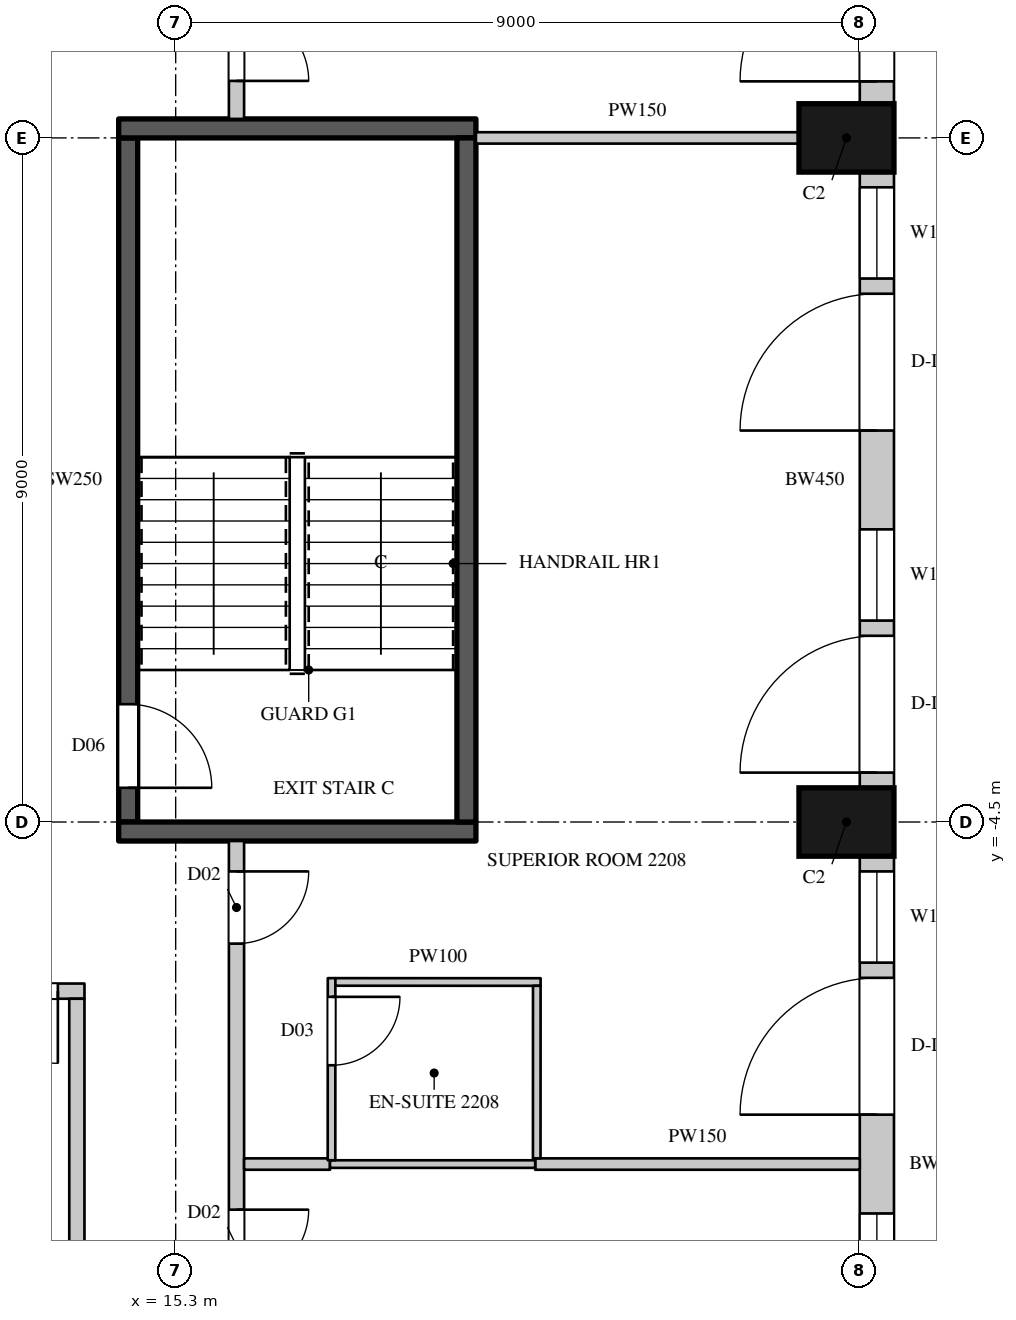
"""IFC4 building model, lengths in metres.
Left out: names, types, materials, properties, quantities, classifications, styles, units other than length and angle.
Written with IfcOpenShell. Run it as: python <this file> out.ifc"""

import sys

from ifc_helpers import new_model, si_unit, direction, frame, frame_2d, origin, origin_2d, place, context, subcontext, project, spatial, rectangle, extrude, element, fill, save


model = new_model("IFC4")
c1 = context("Model", 3, precision=1e-05, world=origin(), true_north=direction((0.0, 1.0)))
c2 = subcontext(c1, "Body", "Model", "MODEL_VIEW")
j1 = project(units=[si_unit("LENGTHUNIT", "METRE"), si_unit("PLANEANGLEUNIT", "RADIAN")], contexts=[c1])
p1 = place(None, origin())
s1 = spatial("IfcSite", under=j1, at=p1, CompositionType="ELEMENT")
p2 = place(p1, origin())
s2 = spatial("IfcBuilding", under=s1, at=p2, CompositionType="ELEMENT")
p3 = place(p2, frame((0.0, 0.0, 109.5)))
s3 = spatial("IfcBuildingStorey", under=s2, at=p3, CompositionType="ELEMENT", Elevation=109.5)
for number, where, z_axis, x_axis in (
    (1, (24.125, -4.5, 0.0), (0.0, 0.0, 1.0), (0.0, 1.0, 0.0)),
    (2, (24.125, 4.5, 0.0), (0.0, 0.0, 1.0), (0.0, 1.0, 0.0)),
):
    element("IfcColumn", number, at=place(p3, frame(where, z_axis=z_axis, x_axis=x_axis)), inside=s3, PredefinedType="COLUMN", context=c2, shape_type="SweptSolid", body=[
        extrude(rectangle(XDim=0.9, YDim=1.25, at=origin_2d()), origin(), (0.0, 0.0, 1.0), 3.6),
    ])
p4 = place(p3, frame((24.525, -13.05, 0.0), z_axis=(0.0, 0.0, 1.0), x_axis=(0.0, 1.0, 0.0)))
e3 = element("IfcWall", 3, at=p4, inside=s3, PredefinedType="SOLIDWALL", context=c2, shape_type="SweptSolid", body=[
    extrude(rectangle(XDim=8.1, YDim=0.45, at=frame_2d((4.05, 0.0))), origin(), (0.0, 0.0, 1.0), 3.3),
])
p5 = place(p4, frame((0.2, 0.0, 0.0)))
e4 = element("IfcOpeningElement", 4, at=p5, cuts=e3, PredefinedType="OPENING", context=c2, shape_type="SweptSolid", body=[
    extrude(rectangle(XDim=1.8, YDim=2.4, at=frame_2d((0.9, 1.2))), frame((0.0, 0.235, 0.0), z_axis=(0.0, -1.0, 0.0), x_axis=(1.0, 0.0, 0.0)), (0.0, 0.0, 1.0), 0.47),
])
p6 = place(p4, frame((2.2, 0.0, 1.05)))
e5 = element("IfcOpeningElement", 5, at=p6, cuts=e3, PredefinedType="OPENING", context=c2, shape_type="SweptSolid", body=[
    extrude(rectangle(XDim=1.2, YDim=2.0, at=frame_2d((0.6, 1.0))), frame((0.0, 0.235, 0.0), z_axis=(0.0, -1.0, 0.0), x_axis=(1.0, 0.0, 0.0)), (0.0, 0.0, 1.0), 0.47),
])
p7 = place(p4, frame((4.7, 0.0, 0.0)))
e6 = element("IfcOpeningElement", 6, at=p7, cuts=e3, PredefinedType="OPENING", context=c2, shape_type="SweptSolid", body=[
    extrude(rectangle(XDim=1.8, YDim=2.4, at=frame_2d((0.9, 1.2))), frame((0.0, 0.235, 0.0), z_axis=(0.0, -1.0, 0.0), x_axis=(1.0, 0.0, 0.0)), (0.0, 0.0, 1.0), 0.47),
])
p8 = place(p4, frame((6.7, 0.0, 1.05)))
e7 = element("IfcOpeningElement", 7, at=p8, cuts=e3, PredefinedType="OPENING", context=c2, shape_type="SweptSolid", body=[
    extrude(rectangle(XDim=1.2, YDim=2.0, at=frame_2d((0.6, 1.0))), frame((0.0, 0.235, 0.0), z_axis=(0.0, -1.0, 0.0), x_axis=(1.0, 0.0, 0.0)), (0.0, 0.0, 1.0), 0.47),
])
p9 = place(p3, frame((24.525, -4.05, 0.0), z_axis=(0.0, 0.0, 1.0), x_axis=(0.0, 1.0, 0.0)))
e8 = element("IfcWall", 8, at=p9, inside=s3, PredefinedType="SOLIDWALL", context=c2, shape_type="SweptSolid", body=[
    extrude(rectangle(XDim=8.1, YDim=0.45, at=frame_2d((4.05, 0.0))), origin(), (0.0, 0.0, 1.0), 3.3),
])
p10 = place(p9, frame((0.2, 0.0, 0.0)))
e9 = element("IfcOpeningElement", 9, at=p10, cuts=e8, PredefinedType="OPENING", context=c2, shape_type="SweptSolid", body=[
    extrude(rectangle(XDim=1.8, YDim=2.4, at=frame_2d((0.9, 1.2))), frame((0.0, 0.235, 0.0), z_axis=(0.0, -1.0, 0.0), x_axis=(1.0, 0.0, 0.0)), (0.0, 0.0, 1.0), 0.47),
])
p11 = place(p9, frame((2.2, 0.0, 1.05)))
e10 = element("IfcOpeningElement", 10, at=p11, cuts=e8, PredefinedType="OPENING", context=c2, shape_type="SweptSolid", body=[
    extrude(rectangle(XDim=1.2, YDim=2.0, at=frame_2d((0.6, 1.0))), frame((0.0, 0.235, 0.0), z_axis=(0.0, -1.0, 0.0), x_axis=(1.0, 0.0, 0.0)), (0.0, 0.0, 1.0), 0.47),
])
p12 = place(p9, frame((4.7, 0.0, 0.0)))
e11 = element("IfcOpeningElement", 11, at=p12, cuts=e8, PredefinedType="OPENING", context=c2, shape_type="SweptSolid", body=[
    extrude(rectangle(XDim=1.8, YDim=2.4, at=frame_2d((0.9, 1.2))), frame((0.0, 0.235, 0.0), z_axis=(0.0, -1.0, 0.0), x_axis=(1.0, 0.0, 0.0)), (0.0, 0.0, 1.0), 0.47),
])
p13 = place(p9, frame((6.7, 0.0, 1.05)))
e12 = element("IfcOpeningElement", 12, at=p13, cuts=e8, PredefinedType="OPENING", context=c2, shape_type="SweptSolid", body=[
    extrude(rectangle(XDim=1.2, YDim=2.0, at=frame_2d((0.6, 1.0))), frame((0.0, 0.235, 0.0), z_axis=(0.0, -1.0, 0.0), x_axis=(1.0, 0.0, 0.0)), (0.0, 0.0, 1.0), 0.47),
])
p14 = place(p3, frame((24.525, 4.95, 0.0), z_axis=(0.0, 0.0, 1.0), x_axis=(0.0, 1.0, 0.0)))
e13 = element("IfcWall", 13, at=p14, inside=s3, PredefinedType="SOLIDWALL", context=c2, shape_type="SweptSolid", body=[
    extrude(rectangle(XDim=8.439, YDim=0.45, at=frame_2d((4.219, 0.0))), origin(), (0.0, 0.0, 1.0), 3.3),
])
p15 = place(p14, frame((0.294, 0.0, 0.0)))
e14 = element("IfcOpeningElement", 14, at=p15, cuts=e13, PredefinedType="OPENING", context=c2, shape_type="SweptSolid", body=[
    extrude(rectangle(XDim=1.8, YDim=2.4, at=frame_2d((0.9, 1.2))), frame((0.0, 0.235, 0.0), z_axis=(0.0, -1.0, 0.0), x_axis=(1.0, 0.0, 0.0)), (0.0, 0.0, 1.0), 0.47),
])
p16 = place(p14, frame((2.294, 0.0, 1.05)))
e15 = element("IfcOpeningElement", 15, at=p16, cuts=e13, PredefinedType="OPENING", context=c2, shape_type="SweptSolid", body=[
    extrude(rectangle(XDim=1.2, YDim=2.0, at=frame_2d((0.6, 1.0))), frame((0.0, 0.235, 0.0), z_axis=(0.0, -1.0, 0.0), x_axis=(1.0, 0.0, 0.0)), (0.0, 0.0, 1.0), 0.47),
])
p17 = place(p14, frame((5.232, 0.0, 1.05)))
e16 = element("IfcOpeningElement", 16, at=p17, cuts=e13, PredefinedType="OPENING", context=c2, shape_type="SweptSolid", body=[
    extrude(rectangle(XDim=2.7, YDim=2.0, at=frame_2d((1.35, 1.0))), frame((0.0, 0.235, 0.0), z_axis=(0.0, -1.0, 0.0), x_axis=(1.0, 0.0, 0.0)), (0.0, 0.0, 1.0), 0.47),
])
p18 = place(p3, frame((10.5, -6.725, 0.0), z_axis=(0.0, 0.0, 1.0), x_axis=(1.0, 0.0, 0.0)))
e17 = element("IfcWall", 17, at=p18, inside=s3, PredefinedType="PARTITIONING", context=c2, shape_type="SweptSolid", body=[
    extrude(rectangle(XDim=3.6, YDim=0.2, at=frame_2d((1.8, 0.0))), origin(), (0.0, 0.0, 1.0), 3.3),
])
p19 = place(p18, frame((2.3, 0.0, 0.0)))
e18 = element("IfcOpeningElement", 18, at=p19, cuts=e17, PredefinedType="OPENING", context=c2, shape_type="SweptSolid", body=[
    extrude(rectangle(XDim=0.95, YDim=2.2, at=frame_2d((0.475, 1.1))), frame((0.0, 0.11, 0.0), z_axis=(0.0, -1.0, 0.0), x_axis=(1.0, 0.0, 0.0)), (0.0, 0.0, 1.0), 0.22),
])
p20 = place(p3, frame((14.0, -15.3, 0.0), z_axis=(0.0, 0.0, 1.0), x_axis=(0.0, 1.0, 0.0)))
e19 = element("IfcWall", 19, at=p20, inside=s3, PredefinedType="PARTITIONING", context=c2, shape_type="SweptSolid", body=[
    extrude(rectangle(XDim=8.475, YDim=0.2, at=frame_2d((4.238, 0.0))), origin(), (0.0, 0.0, 1.0), 3.3),
])
p21 = place(p3, frame((16.1, -17.5, 0.0), z_axis=(0.0, 0.0, 1.0), x_axis=(0.0, 1.0, 0.0)))
e20 = element("IfcWall", 20, at=p21, inside=s3, PredefinedType="PARTITIONING", context=c2, shape_type="SweptSolid", body=[
    extrude(rectangle(XDim=12.75, YDim=0.2, at=frame_2d((6.375, 0.0))), origin(), (0.0, 0.0, 1.0), 3.3),
])
p22 = place(p21, frame((2.75, 0.0, 0.0)))
e21 = element("IfcOpeningElement", 21, at=p22, cuts=e20, PredefinedType="OPENING", context=c2, shape_type="SweptSolid", body=[
    extrude(rectangle(XDim=0.95, YDim=2.2, at=frame_2d((0.475, 1.1))), frame((0.0, 0.11, 0.0), z_axis=(0.0, -1.0, 0.0), x_axis=(1.0, 0.0, 0.0)), (0.0, 0.0, 1.0), 0.22),
])
p23 = place(p21, frame((6.95, 0.0, 0.0)))
e22 = element("IfcOpeningElement", 22, at=p23, cuts=e20, PredefinedType="OPENING", context=c2, shape_type="SweptSolid", body=[
    extrude(rectangle(XDim=0.95, YDim=2.2, at=frame_2d((0.475, 1.1))), frame((0.0, 0.11, 0.0), z_axis=(0.0, -1.0, 0.0), x_axis=(1.0, 0.0, 0.0)), (0.0, 0.0, 1.0), 0.22),
])
p24 = place(p21, frame((11.4, 0.0, 0.0)))
e23 = element("IfcOpeningElement", 23, at=p24, cuts=e20, PredefinedType="OPENING", context=c2, shape_type="SweptSolid", body=[
    extrude(rectangle(XDim=0.95, YDim=2.2, at=frame_2d((0.475, 1.1))), frame((0.0, 0.11, 0.0), z_axis=(0.0, -1.0, 0.0), x_axis=(1.0, 0.0, 0.0)), (0.0, 0.0, 1.0), 0.22),
])
p25 = place(p3, frame((16.1, 4.75, 0.0), z_axis=(0.0, 0.0, 1.0), x_axis=(0.0, 1.0, 0.0)))
e24 = element("IfcWall", 24, at=p25, inside=s3, PredefinedType="PARTITIONING", context=c2, shape_type="SweptSolid", body=[
    extrude(rectangle(XDim=12.65, YDim=0.2, at=frame_2d((6.325, 0.0))), origin(), (0.0, 0.0, 1.0), 3.3),
])
p26 = place(p25, frame((0.5, 0.0, 0.0)))
e25 = element("IfcOpeningElement", 25, at=p26, cuts=e24, PredefinedType="OPENING", context=c2, shape_type="SweptSolid", body=[
    extrude(rectangle(XDim=0.95, YDim=2.2, at=frame_2d((0.475, 1.1))), frame((0.0, 0.11, 0.0), z_axis=(0.0, -1.0, 0.0), x_axis=(1.0, 0.0, 0.0)), (0.0, 0.0, 1.0), 0.22),
])
p27 = place(p25, frame((6.9, 0.0, 0.0)))
e26 = element("IfcOpeningElement", 26, at=p27, cuts=e24, PredefinedType="OPENING", context=c2, shape_type="SweptSolid", body=[
    extrude(rectangle(XDim=0.95, YDim=2.2, at=frame_2d((0.475, 1.1))), frame((0.0, 0.11, 0.0), z_axis=(0.0, -1.0, 0.0), x_axis=(1.0, 0.0, 0.0)), (0.0, 0.0, 1.0), 0.22),
])
p28 = place(p3, frame((16.2, -9.0, 0.0), z_axis=(0.0, 0.0, 1.0), x_axis=(1.0, 0.0, 0.0)))
e27 = element("IfcWall", 27, at=p28, inside=s3, PredefinedType="PARTITIONING", context=c2, shape_type="SweptSolid", body=[
    extrude(rectangle(XDim=1.13, YDim=0.15, at=frame_2d((0.565, 0.0))), origin(), (0.0, 0.0, 1.0), 2.65),
])
p29 = place(p3, frame((19.25, 4.5, 0.0), z_axis=(0.0, 0.0, 1.0), x_axis=(1.0, 0.0, 0.0)))
e28 = element("IfcWall", 28, at=p29, inside=s3, PredefinedType="PARTITIONING", context=c2, shape_type="SweptSolid", body=[
    extrude(rectangle(XDim=4.25, YDim=0.15, at=frame_2d((2.125, 0.0))), origin(), (0.0, 0.0, 1.0), 3.3),
])
p30 = place(p3, frame((20.03, -9.0, 0.0), z_axis=(0.0, 0.0, 1.0), x_axis=(1.0, 0.0, 0.0)))
e29 = element("IfcWall", 29, at=p30, inside=s3, PredefinedType="PARTITIONING", context=c2, shape_type="SweptSolid", body=[
    extrude(rectangle(XDim=4.27, YDim=0.15, at=frame_2d((2.135, 0.0))), origin(), (0.0, 0.0, 1.0), 2.65),
])
p31 = place(p3, frame((14.675, -4.5, 0.0), z_axis=(0.0, 0.0, 1.0), x_axis=(0.0, 1.0, 0.0)))
e30 = element("IfcWall", 30, at=p31, inside=s3, PredefinedType="SHEAR", context=c2, shape_type="SweptSolid", body=[
    extrude(rectangle(XDim=9.0, YDim=0.25, at=frame_2d((4.5, 0.0))), origin(), (0.0, 0.0, 1.0), 3.3),
])
p32 = place(p31, frame((0.45, 0.0, 0.0)))
e31 = element("IfcOpeningElement", 31, at=p32, cuts=e30, PredefinedType="OPENING", context=c2, shape_type="SweptSolid", body=[
    extrude(rectangle(XDim=1.1, YDim=2.2, at=frame_2d((0.55, 1.1))), frame((0.0, 0.135, 0.0), z_axis=(0.0, -1.0, 0.0), x_axis=(1.0, 0.0, 0.0)), (0.0, 0.0, 1.0), 0.27),
])
for number, where, z_axis, x_axis in (
    (32, (14.55, -4.625, 0.0), (0.0, 0.0, 1.0), (1.0, 0.0, 0.0)),
    (33, (14.55, 4.625, 0.0), (0.0, 0.0, 1.0), (1.0, 0.0, 0.0)),
):
    element("IfcWall", number, at=place(p3, frame(where, z_axis=z_axis, x_axis=x_axis)), inside=s3, PredefinedType="SHEAR", context=c2, shape_type="SweptSolid", body=[
        extrude(rectangle(XDim=4.7, YDim=0.25, at=frame_2d((2.35, 0.0))), origin(), (0.0, 0.0, 1.0), 3.3),
    ])
p33 = place(p3, frame((19.125, -4.5, 0.0), z_axis=(0.0, 0.0, 1.0), x_axis=(0.0, 1.0, 0.0)))
e34 = element("IfcWall", 34, at=p33, inside=s3, PredefinedType="SHEAR", context=c2, shape_type="SweptSolid", body=[
    extrude(rectangle(XDim=9.0, YDim=0.25, at=frame_2d((4.5, 0.0))), origin(), (0.0, 0.0, 1.0), 3.3),
])
p34 = place(p3, frame((17.33, -9.0, 0.0), z_axis=(0.0, 0.0, 1.0), x_axis=(1.0, 0.0, 0.0)))
e35 = element("IfcWall", 35, at=p34, inside=s3, PredefinedType="PARTITIONING", context=c2, shape_type="SweptSolid", body=[
    extrude(rectangle(XDim=2.7, YDim=0.1, at=frame_2d((1.35, 0.0))), origin(), (0.0, 0.0, 1.0), 2.65),
])
p35 = place(p3, frame((17.35, -8.95, 0.0), z_axis=(0.0, 0.0, 1.0), x_axis=(0.000407580973, 0.999999916939, 0.0)))
e36 = element("IfcWall", 36, at=p35, inside=s3, PredefinedType="PARTITIONING", context=c2, shape_type="SweptSolid", body=[
    extrude(rectangle(XDim=2.396, YDim=0.1, at=frame_2d((1.198, 0.0))), origin(), (0.0, 0.0, 1.0), 3.3),
])
p36 = place(p35, frame((1.25, 0.0, 0.0)))
e37 = element("IfcOpeningElement", 37, at=p36, cuts=e36, PredefinedType="OPENING", context=c2, shape_type="SweptSolid", body=[
    extrude(rectangle(XDim=0.9, YDim=2.2, at=frame_2d((0.45, 1.1))), frame((0.0, 0.06, 0.0), z_axis=(0.0, -1.0, 0.0), x_axis=(1.0, 0.0, 0.0)), (0.0, 0.0, 1.0), 0.12),
])
p37 = place(p3, frame((17.401, -6.604, 0.0), z_axis=(0.0, 0.0, 1.0), x_axis=(0.9999999346, -0.000361663629, 0.0)))
e38 = element("IfcWall", 38, at=p37, inside=s3, PredefinedType="PARTITIONING", context=c2, shape_type="SweptSolid", body=[
    extrude(rectangle(XDim=2.7, YDim=0.1, at=frame_2d((1.35, 0.0))), origin(), (0.0, 0.0, 1.0), 3.3),
])
p38 = place(p3, frame((20.05, -8.925, 0.0), z_axis=(0.0, 0.0, 1.0), x_axis=(0.000430200003, 0.999999907464, 0.0)))
e39 = element("IfcWall", 39, at=p38, inside=s3, PredefinedType="PARTITIONING", context=c2, shape_type="SweptSolid", body=[
    extrude(rectangle(XDim=2.27, YDim=0.1, at=frame_2d((1.135, 0.0))), origin(), (0.0, 0.0, 1.0), 3.3),
])
p39 = place(p6, origin())
e40 = element("IfcWindow", 40, at=p39, inside=s3, PartitioningType="SINGLE_PANEL", PredefinedType="WINDOW", context=c2, shape_type="SweptSolid", body=[
    extrude(rectangle(XDim=1.2, YDim=2.0, at=frame_2d((0.6, 1.0))), frame((0.0, 0.135, 0.0), z_axis=(0.0, -1.0, 0.0), x_axis=(1.0, 0.0, 0.0)), (0.0, 0.0, 1.0), 0.06),
])
fill(e5, e40)
p40 = place(p7, origin())
e41 = element("IfcDoor", 41, at=p40, inside=s3, OperationType="SLIDING_TO_LEFT", PredefinedType="DOOR", context=c2, shape_type="SweptSolid", body=[
    extrude(rectangle(XDim=1.8, YDim=2.4, at=frame_2d((0.9, 1.2))), frame((0.0, 0.13, 0.0), z_axis=(0.0, -1.0, 0.0), x_axis=(1.0, 0.0, 0.0)), (0.0, 0.0, 1.0), 0.05),
])
fill(e6, e41)
p41 = place(p8, origin())
e42 = element("IfcWindow", 42, at=p41, inside=s3, PartitioningType="SINGLE_PANEL", PredefinedType="WINDOW", context=c2, shape_type="SweptSolid", body=[
    extrude(rectangle(XDim=1.2, YDim=2.0, at=frame_2d((0.6, 1.0))), frame((0.0, 0.135, 0.0), z_axis=(0.0, -1.0, 0.0), x_axis=(1.0, 0.0, 0.0)), (0.0, 0.0, 1.0), 0.06),
])
fill(e7, e42)
p42 = place(p10, origin())
e43 = element("IfcDoor", 43, at=p42, inside=s3, OperationType="SLIDING_TO_LEFT", PredefinedType="DOOR", context=c2, shape_type="SweptSolid", body=[
    extrude(rectangle(XDim=1.8, YDim=2.4, at=frame_2d((0.9, 1.2))), frame((0.0, 0.13, 0.0), z_axis=(0.0, -1.0, 0.0), x_axis=(1.0, 0.0, 0.0)), (0.0, 0.0, 1.0), 0.05),
])
fill(e9, e43)
p43 = place(p11, origin())
e44 = element("IfcWindow", 44, at=p43, inside=s3, PartitioningType="SINGLE_PANEL", PredefinedType="WINDOW", context=c2, shape_type="SweptSolid", body=[
    extrude(rectangle(XDim=1.2, YDim=2.0, at=frame_2d((0.6, 1.0))), frame((0.0, 0.135, 0.0), z_axis=(0.0, -1.0, 0.0), x_axis=(1.0, 0.0, 0.0)), (0.0, 0.0, 1.0), 0.06),
])
fill(e10, e44)
p44 = place(p12, origin())
e45 = element("IfcDoor", 45, at=p44, inside=s3, OperationType="SLIDING_TO_LEFT", PredefinedType="DOOR", context=c2, shape_type="SweptSolid", body=[
    extrude(rectangle(XDim=1.8, YDim=2.4, at=frame_2d((0.9, 1.2))), frame((0.0, 0.13, 0.0), z_axis=(0.0, -1.0, 0.0), x_axis=(1.0, 0.0, 0.0)), (0.0, 0.0, 1.0), 0.05),
])
fill(e11, e45)
p45 = place(p13, origin())
e46 = element("IfcWindow", 46, at=p45, inside=s3, PartitioningType="SINGLE_PANEL", PredefinedType="WINDOW", context=c2, shape_type="SweptSolid", body=[
    extrude(rectangle(XDim=1.2, YDim=2.0, at=frame_2d((0.6, 1.0))), frame((0.0, 0.135, 0.0), z_axis=(0.0, -1.0, 0.0), x_axis=(1.0, 0.0, 0.0)), (0.0, 0.0, 1.0), 0.06),
])
fill(e12, e46)
p46 = place(p15, origin())
e47 = element("IfcDoor", 47, at=p46, inside=s3, OperationType="SLIDING_TO_LEFT", PredefinedType="DOOR", context=c2, shape_type="SweptSolid", body=[
    extrude(rectangle(XDim=1.8, YDim=2.4, at=frame_2d((0.9, 1.2))), frame((0.0, 0.13, 0.0), z_axis=(0.0, -1.0, 0.0), x_axis=(1.0, 0.0, 0.0)), (0.0, 0.0, 1.0), 0.05),
])
fill(e14, e47)
p47 = place(p19, origin())
e48 = element("IfcDoor", 48, at=p47, inside=s3, OperationType="SINGLE_SWING_LEFT", PredefinedType="DOOR", context=c2, shape_type="SweptSolid", body=[
    extrude(rectangle(XDim=0.95, YDim=2.2, at=frame_2d((0.475, 1.1))), frame((0.0, 0.025, 0.0), z_axis=(0.0, -1.0, 0.0), x_axis=(1.0, 0.0, 0.0)), (0.0, 0.0, 1.0), 0.05),
])
fill(e18, e48)
p48 = place(p23, origin())
e49 = element("IfcDoor", 49, at=p48, inside=s3, OperationType="SINGLE_SWING_LEFT", PredefinedType="DOOR", context=c2, shape_type="SweptSolid", body=[
    extrude(rectangle(XDim=0.95, YDim=2.2, at=frame_2d((0.475, 1.1))), frame((0.0, 0.025, 0.0), z_axis=(0.0, -1.0, 0.0), x_axis=(1.0, 0.0, 0.0)), (0.0, 0.0, 1.0), 0.05),
])
fill(e22, e49)
p49 = place(p24, origin())
e50 = element("IfcDoor", 50, at=p49, inside=s3, OperationType="SINGLE_SWING_LEFT", PredefinedType="DOOR", context=c2, shape_type="SweptSolid", body=[
    extrude(rectangle(XDim=0.95, YDim=2.2, at=frame_2d((0.475, 1.1))), frame((0.0, 0.025, 0.0), z_axis=(0.0, -1.0, 0.0), x_axis=(1.0, 0.0, 0.0)), (0.0, 0.0, 1.0), 0.05),
])
fill(e23, e50)
p50 = place(p36, origin())
e51 = element("IfcDoor", 51, at=p50, inside=s3, OperationType="SINGLE_SWING_LEFT", PredefinedType="DOOR", context=c2, shape_type="SweptSolid", body=[
    extrude(rectangle(XDim=0.9, YDim=2.2, at=frame_2d((0.45, 1.1))), frame((0.0, 0.025, 0.0), z_axis=(0.0, -1.0, 0.0), x_axis=(1.0, 0.0, 0.0)), (0.0, 0.0, 1.0), 0.05),
])
fill(e37, e51)
p51 = place(p26, origin())
e52 = element("IfcDoor", 52, at=p51, inside=s3, OperationType="SINGLE_SWING_RIGHT", PredefinedType="DOOR", context=c2, shape_type="SweptSolid", body=[
    extrude(rectangle(XDim=0.95, YDim=2.2, at=frame_2d((0.475, 1.1))), frame((0.0, 0.025, 0.0), z_axis=(0.0, -1.0, 0.0), x_axis=(1.0, 0.0, 0.0)), (0.0, 0.0, 1.0), 0.05),
])
fill(e25, e52)
p52 = place(p32, origin())
e53 = element("IfcDoor", 53, at=p52, inside=s3, OperationType="SINGLE_SWING_RIGHT", PredefinedType="DOOR", context=c2, shape_type="SweptSolid", body=[
    extrude(rectangle(XDim=1.1, YDim=2.2, at=frame_2d((0.55, 1.1))), frame((0.0, 0.025, 0.0), z_axis=(0.0, -1.0, 0.0), x_axis=(1.0, 0.0, 0.0)), (0.0, 0.0, 1.0), 0.05),
])
fill(e31, e53)
save(model, sys.argv[1])
